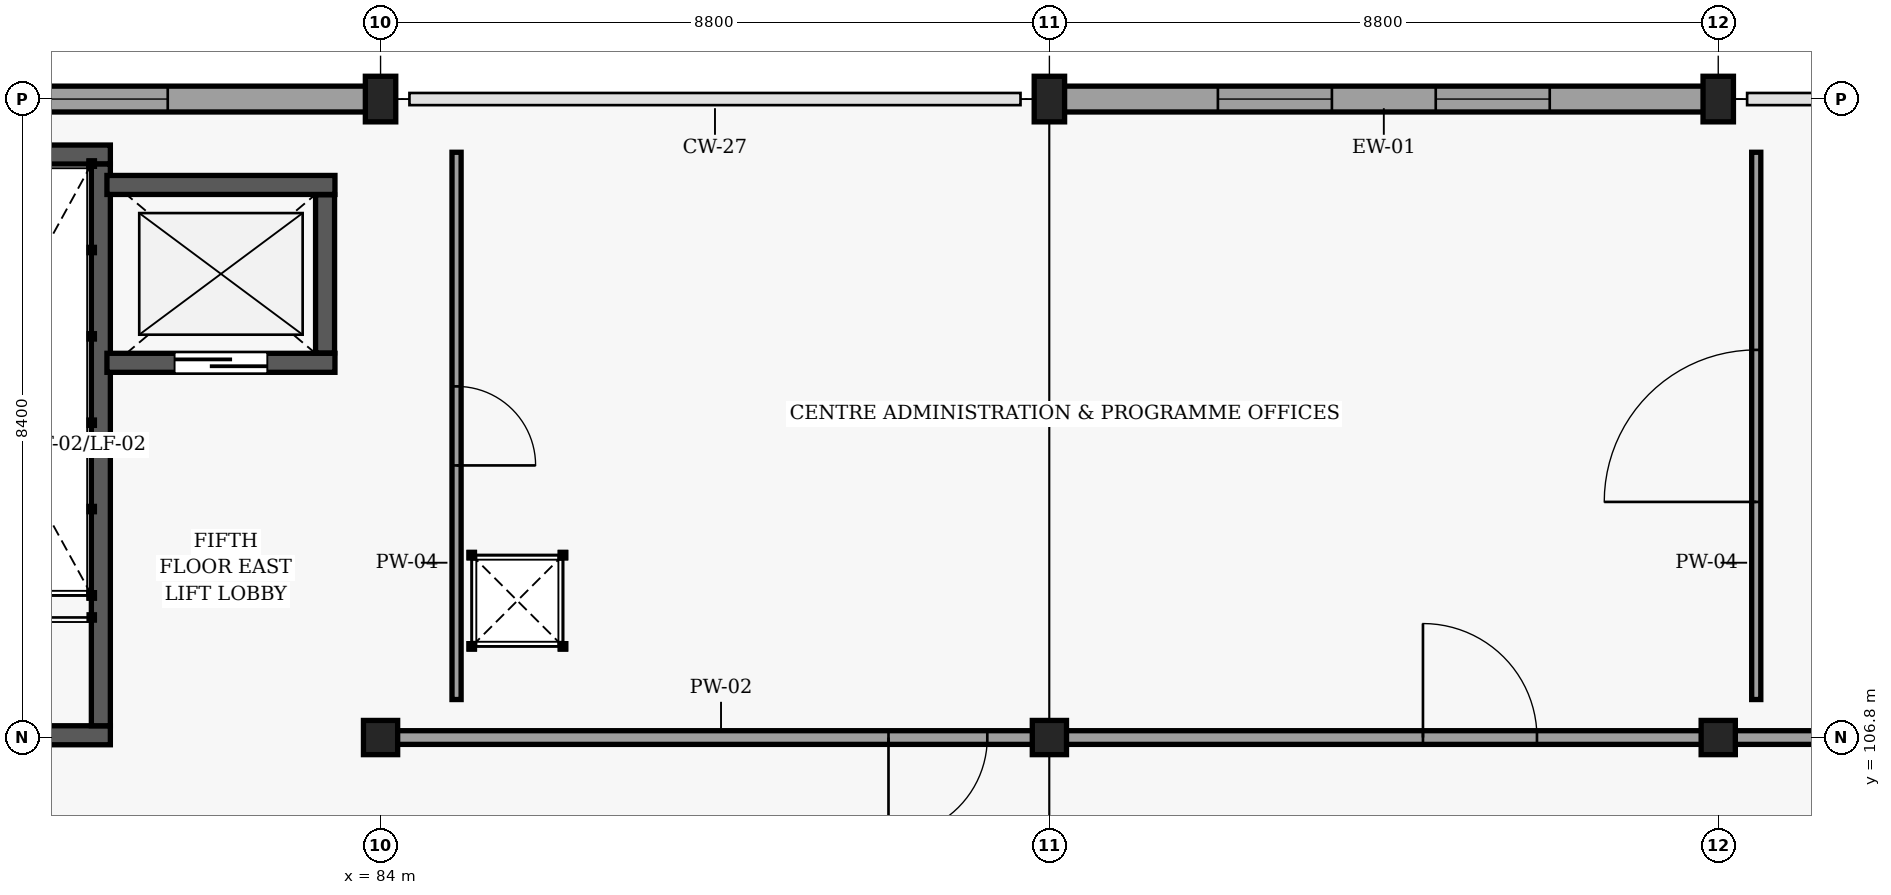
"""IFC4 building model, lengths in metres.
Left out: names, types, materials, properties, quantities, classifications, styles, units other than length and angle.
Written with IfcOpenShell. Run it as: python <this file> out.ifc"""

import sys

from ifc_helpers import new_model, si_unit, direction, frame, frame_2d, origin, origin_2d, place, context, subcontext, project, spatial, rectangle, extrude, element, fill, save


model = new_model("IFC4")
c1 = context("Model", 3, precision=1e-05, world=origin(), true_north=direction((0.0, 1.0)))
c2 = subcontext(c1, "Body", "Model", "MODEL_VIEW")
j1 = project(units=[si_unit("LENGTHUNIT", "METRE"), si_unit("PLANEANGLEUNIT", "RADIAN")], contexts=[c1])
p1 = place(None, origin())
s1 = spatial("IfcSite", under=j1, at=p1, CompositionType="ELEMENT")
p2 = place(p1, origin())
s2 = spatial("IfcBuilding", under=s1, at=p2, CompositionType="ELEMENT")
p3 = place(p2, frame((0.0, 0.0, 20.1)))
s3 = spatial("IfcBuildingStorey", under=s2, at=p3, CompositionType="ELEMENT", Elevation=20.1)
p4 = place(p3, frame((84.0, 106.8, 0.0), z_axis=(0.0, 0.0, 1.0), x_axis=(1.0, 0.0, 0.0)))
e1 = element("IfcColumn", 1, at=p4, inside=s3, PredefinedType="COLUMN", context=c2, shape_type="SweptSolid", body=[
    extrude(rectangle(XDim=0.45, YDim=0.45, at=origin_2d()), origin(), (0.0, 0.0, 1.0), 4.2),
])
p5 = place(p3, frame((84.0, 115.2, 0.0), z_axis=(0.0, 0.0, 1.0), x_axis=(1.0, 0.0, 0.0)))
e2 = element("IfcColumn", 2, at=p5, inside=s3, PredefinedType="COLUMN", context=c2, shape_type="SweptSolid", body=[
    extrude(rectangle(XDim=0.4, YDim=0.6, at=origin_2d()), origin(), (0.0, 0.0, 1.0), 4.2),
])
p6 = place(p3, frame((92.8, 106.8, 0.0), z_axis=(0.0, 0.0, 1.0), x_axis=(1.0, 0.0, 0.0)))
e3 = element("IfcColumn", 3, at=p6, inside=s3, PredefinedType="COLUMN", context=c2, shape_type="SweptSolid", body=[
    extrude(rectangle(XDim=0.45, YDim=0.45, at=origin_2d()), origin(), (0.0, 0.0, 1.0), 4.2),
])
p7 = place(p3, frame((92.8, 115.2, 0.0), z_axis=(0.0, 0.0, 1.0), x_axis=(1.0, 0.0, 0.0)))
e4 = element("IfcColumn", 4, at=p7, inside=s3, PredefinedType="COLUMN", context=c2, shape_type="SweptSolid", body=[
    extrude(rectangle(XDim=0.4, YDim=0.6, at=origin_2d()), origin(), (0.0, 0.0, 1.0), 4.2),
])
p8 = place(p3, frame((101.6, 106.8, 0.0), z_axis=(0.0, 0.0, 1.0), x_axis=(1.0, 0.0, 0.0)))
e5 = element("IfcColumn", 5, at=p8, inside=s3, PredefinedType="COLUMN", context=c2, shape_type="SweptSolid", body=[
    extrude(rectangle(XDim=0.45, YDim=0.45, at=origin_2d()), origin(), (0.0, 0.0, 1.0), 4.2),
])
p9 = place(p3, frame((101.6, 115.2, 0.0), z_axis=(0.0, 0.0, 1.0), x_axis=(1.0, 0.0, 0.0)))
e6 = element("IfcColumn", 6, at=p9, inside=s3, PredefinedType="COLUMN", context=c2, shape_type="SweptSolid", body=[
    extrude(rectangle(XDim=0.4, YDim=0.6, at=origin_2d()), origin(), (0.0, 0.0, 1.0), 4.2),
])
p10 = place(p3, frame((75.3, 115.2, 0.0), z_axis=(0.0, 0.0, 1.0), x_axis=(1.0, 0.0, 0.0)))
e7 = element("IfcWall", 7, at=p10, inside=s3, PredefinedType="SOLIDWALL", context=c2, shape_type="SweptSolid", body=[
    extrude(rectangle(XDim=8.6, YDim=0.34, at=frame_2d((4.3, 0.0))), origin(), (0.0, 0.0, 1.0), 3.568),
])
p11 = place(p10, frame((2.7, 0.0, 0.95)))
e8 = element("IfcOpeningElement", 8, at=p11, cuts=e7, PredefinedType="OPENING", context=c2, shape_type="SweptSolid", body=[
    extrude(rectangle(XDim=3.2, YDim=2.1, at=frame_2d((1.6, 1.05))), frame((0.0, 0.18, 0.0), z_axis=(0.0, -1.0, 0.0), x_axis=(1.0, 0.0, 0.0)), (0.0, 0.0, 1.0), 0.36),
])
p12 = place(p3, frame((92.9, 115.2, 0.0), z_axis=(0.0, 0.0, 1.0), x_axis=(1.0, 0.0, 0.0)))
e9 = element("IfcWall", 9, at=p12, inside=s3, PredefinedType="SOLIDWALL", context=c2, shape_type="SweptSolid", body=[
    extrude(rectangle(XDim=8.6, YDim=0.34, at=frame_2d((4.3, 0.0))), origin(), (0.0, 0.0, 1.0), 3.568),
])
p13 = place(p12, frame((2.117, 0.0, 0.948)))
e10 = element("IfcOpeningElement", 10, at=p13, cuts=e9, PredefinedType="OPENING", context=c2, shape_type="SweptSolid", body=[
    extrude(rectangle(XDim=1.5, YDim=2.4, at=frame_2d((0.75, 1.2))), frame((0.0, 0.18, 0.0), z_axis=(0.0, -1.0, 0.0), x_axis=(1.0, 0.0, 0.0)), (0.0, 0.0, 1.0), 0.36),
])
p14 = place(p12, frame((4.983, 0.0, 0.948)))
e11 = element("IfcOpeningElement", 11, at=p14, cuts=e9, PredefinedType="OPENING", context=c2, shape_type="SweptSolid", body=[
    extrude(rectangle(XDim=1.5, YDim=2.4, at=frame_2d((0.75, 1.2))), frame((0.0, 0.18, 0.0), z_axis=(0.0, -1.0, 0.0), x_axis=(1.0, 0.0, 0.0)), (0.0, 0.0, 1.0), 0.36),
])
p15 = place(p3, frame((80.445, 106.83, 0.0), z_axis=(0.0, 0.0, 1.0), x_axis=(-1.0, 0.0, 0.0)))
e12 = element("IfcWall", 12, at=p15, inside=s3, PredefinedType="SHEAR", context=c2, shape_type="SweptSolid", body=[
    extrude(rectangle(XDim=3.61, YDim=0.25, at=frame_2d((1.805, 0.0))), origin(), (0.0, 0.0, 1.0), 4.0),
])
p16 = place(p15, frame((1.235, 0.0, 0.0)))
e13 = element("IfcOpeningElement", 13, at=p16, cuts=e12, PredefinedType="OPENING", context=c2, shape_type="SweptSolid", body=[
    extrude(rectangle(XDim=1.14, YDim=2.15, at=frame_2d((0.57, 1.075))), frame((0.0, 0.135, 0.0), z_axis=(0.0, -1.0, 0.0), x_axis=(1.0, 0.0, 0.0)), (0.0, 0.0, 1.0), 0.27),
])
p17 = place(p3, frame((76.835, 114.47, 0.0), z_axis=(0.0, 0.0, 1.0), x_axis=(1.0, 0.0, 0.0)))
e14 = element("IfcWall", 14, at=p17, inside=s3, PredefinedType="SHEAR", context=c2, shape_type="SweptSolid", body=[
    extrude(rectangle(XDim=3.61, YDim=0.25, at=frame_2d((1.805, 0.0))), origin(), (0.0, 0.0, 1.0), 4.0),
])
p18 = place(p3, frame((80.32, 114.345, 0.0), z_axis=(0.0, 0.0, 1.0), x_axis=(0.0, -1.0, 0.0)))
e15 = element("IfcWall", 15, at=p18, inside=s3, PredefinedType="SHEAR", context=c2, shape_type="SweptSolid", body=[
    extrude(rectangle(XDim=7.39, YDim=0.25, at=frame_2d((3.695, 0.0))), origin(), (0.0, 0.0, 1.0), 4.0),
])
p19 = place(p3, frame((80.4, 111.73, 0.0), z_axis=(0.0, 0.0, 1.0), x_axis=(1.0, 0.0, 0.0)))
e16 = element("IfcWall", 16, at=p19, inside=s3, PredefinedType="SHEAR", context=c2, shape_type="SweptSolid", body=[
    extrude(rectangle(XDim=3.0, YDim=0.25, at=frame_2d((1.5, 0.0))), origin(), (0.0, 0.0, 1.0), 4.0),
])
p20 = place(p19, frame((0.89, 0.0, 0.0)))
e17 = element("IfcOpeningElement", 17, at=p20, cuts=e16, PredefinedType="OPENING", context=c2, shape_type="SweptSolid", body=[
    extrude(rectangle(XDim=1.22, YDim=2.18, at=frame_2d((0.61, 1.09))), frame((0.0, 0.135, 0.0), z_axis=(0.0, -1.0, 0.0), x_axis=(1.0, 0.0, 0.0)), (0.0, 0.0, 1.0), 0.27),
])
p21 = place(p3, frame((83.4, 114.07, 0.0), z_axis=(0.0, 0.0, 1.0), x_axis=(-1.0, 0.0, 0.0)))
e18 = element("IfcWall", 18, at=p21, inside=s3, PredefinedType="SHEAR", context=c2, shape_type="SweptSolid", body=[
    extrude(rectangle(XDim=3.0, YDim=0.25, at=frame_2d((1.5, 0.0))), origin(), (0.0, 0.0, 1.0), 4.0),
])
p22 = place(p3, frame((83.27, 111.86, 0.0), z_axis=(0.0, 0.0, 1.0), x_axis=(0.0, 1.0, 0.0)))
e19 = element("IfcWall", 19, at=p22, inside=s3, PredefinedType="SHEAR", context=c2, shape_type="SweptSolid", body=[
    extrude(rectangle(XDim=2.08, YDim=0.25, at=frame_2d((1.04, 0.0))), origin(), (0.0, 0.0, 1.0), 4.0),
])
p23 = place(p3, frame((84.2, 106.8, 0.0), z_axis=(0.0, 0.0, 1.0), x_axis=(1.0, 0.0, 0.0)))
e20 = element("IfcWall", 20, at=p23, inside=s3, PredefinedType="PARTITIONING", context=c2, shape_type="SweptSolid", body=[
    extrude(rectangle(XDim=28.53, YDim=0.18, at=frame_2d((14.265, 0.0))), origin(), (0.0, 0.0, 1.0), 3.568),
])
p24 = place(p23, frame((6.483, 0.0, 0.0)))
e21 = element("IfcOpeningElement", 21, at=p24, cuts=e20, PredefinedType="OPENING", context=c2, shape_type="SweptSolid", body=[
    extrude(rectangle(XDim=1.3, YDim=2.2, at=frame_2d((0.65, 1.1))), frame((0.0, 0.1, 0.0), z_axis=(0.0, -1.0, 0.0), x_axis=(1.0, 0.0, 0.0)), (0.0, 0.0, 1.0), 0.2),
])
p25 = place(p23, frame((13.515, 0.0, 0.0)))
e22 = element("IfcOpeningElement", 22, at=p25, cuts=e20, PredefinedType="OPENING", context=c2, shape_type="SweptSolid", body=[
    extrude(rectangle(XDim=1.5, YDim=2.25, at=frame_2d((0.75, 1.125))), frame((0.0, 0.1, 0.0), z_axis=(0.0, -1.0, 0.0), x_axis=(1.0, 0.0, 0.0)), (0.0, 0.0, 1.0), 0.2),
])
p26 = place(p23, frame((20.777, 0.0, 0.0)))
e23 = element("IfcOpeningElement", 23, at=p26, cuts=e20, PredefinedType="OPENING", context=c2, shape_type="SweptSolid", body=[
    extrude(rectangle(XDim=1.24, YDim=2.2, at=frame_2d((0.62, 1.1))), frame((0.0, 0.1, 0.0), z_axis=(0.0, -1.0, 0.0), x_axis=(1.0, 0.0, 0.0)), (0.0, 0.0, 1.0), 0.2),
])
p27 = place(p3, frame((85.0, 107.3, 0.0), z_axis=(0.0, 0.0, 1.0), x_axis=(0.0, 1.0, 0.0)))
e24 = element("IfcWall", 24, at=p27, inside=s3, PredefinedType="PARTITIONING", context=c2, shape_type="SweptSolid", body=[
    extrude(rectangle(XDim=7.2, YDim=0.12, at=frame_2d((3.6, 0.0))), origin(), (0.0, 0.0, 1.0), 3.985),
])
p28 = place(p27, frame((3.08, 0.0, 0.0)))
e25 = element("IfcOpeningElement", 25, at=p28, cuts=e24, PredefinedType="OPENING", context=c2, shape_type="SweptSolid", body=[
    extrude(rectangle(XDim=1.04, YDim=2.08, at=frame_2d((0.52, 1.04))), frame((0.0, 0.07, 0.0), z_axis=(0.0, -1.0, 0.0), x_axis=(1.0, 0.0, 0.0)), (0.0, 0.0, 1.0), 0.14),
])
p29 = place(p3, frame((102.1, 107.3, 0.0), z_axis=(0.0, 0.0, 1.0), x_axis=(0.0, 1.0, 0.0)))
e26 = element("IfcWall", 26, at=p29, inside=s3, PredefinedType="PARTITIONING", context=c2, shape_type="SweptSolid", body=[
    extrude(rectangle(XDim=7.2, YDim=0.12, at=frame_2d((3.6, 0.0))), origin(), (0.0, 0.0, 1.0), 3.985),
])
p30 = place(p29, frame((2.6, 0.0, 0.0)))
e27 = element("IfcOpeningElement", 27, at=p30, cuts=e26, PredefinedType="OPENING", context=c2, shape_type="SweptSolid", body=[
    extrude(rectangle(XDim=2.0, YDim=2.3, at=frame_2d((1.0, 1.15))), frame((0.0, 0.07, 0.0), z_axis=(0.0, -1.0, 0.0), x_axis=(1.0, 0.0, 0.0)), (0.0, 0.0, 1.0), 0.14),
])
p31 = place(p11, origin())
e28 = element("IfcWindow", 28, at=p31, inside=s3, PartitioningType="SINGLE_PANEL", PredefinedType="WINDOW", context=c2, shape_type="SweptSolid", body=[
    extrude(rectangle(XDim=3.2, YDim=2.1, at=frame_2d((1.6, 1.05))), frame((0.0, 0.03, 0.0), z_axis=(0.0, -1.0, 0.0), x_axis=(1.0, 0.0, 0.0)), (0.0, 0.0, 1.0), 0.06),
])
fill(e8, e28)
p32 = place(p13, origin())
e29 = element("IfcWindow", 29, at=p32, inside=s3, PartitioningType="SINGLE_PANEL", PredefinedType="WINDOW", context=c2, shape_type="SweptSolid", body=[
    extrude(rectangle(XDim=1.5, YDim=2.4, at=frame_2d((0.75, 1.2))), frame((0.0, 0.03, 0.0), z_axis=(0.0, -1.0, 0.0), x_axis=(1.0, 0.0, 0.0)), (0.0, 0.0, 1.0), 0.06),
])
fill(e10, e29)
p33 = place(p14, origin())
e30 = element("IfcWindow", 30, at=p33, inside=s3, PartitioningType="SINGLE_PANEL", PredefinedType="WINDOW", context=c2, shape_type="SweptSolid", body=[
    extrude(rectangle(XDim=1.5, YDim=2.4, at=frame_2d((0.75, 1.2))), frame((0.0, 0.03, 0.0), z_axis=(0.0, -1.0, 0.0), x_axis=(1.0, 0.0, 0.0)), (0.0, 0.0, 1.0), 0.06),
])
fill(e11, e30)
p34 = place(p20, origin())
e31 = element("IfcDoor", 31, at=p34, inside=s3, OperationType="SLIDING_TO_RIGHT", PredefinedType="DOOR", context=c2, shape_type="SweptSolid", body=[
    extrude(rectangle(XDim=1.22, YDim=2.18, at=frame_2d((0.61, 1.09))), frame((0.0, 0.025, 0.0), z_axis=(0.0, -1.0, 0.0), x_axis=(1.0, 0.0, 0.0)), (0.0, 0.0, 1.0), 0.05),
])
fill(e17, e31)
p35 = place(p24, origin())
e32 = element("IfcDoor", 32, at=p35, inside=s3, OperationType="SINGLE_SWING_RIGHT", PredefinedType="DOOR", context=c2, shape_type="SweptSolid", body=[
    extrude(rectangle(XDim=1.3, YDim=2.2, at=frame_2d((0.65, 1.1))), frame((0.0, 0.025, 0.0), z_axis=(0.0, -1.0, 0.0), x_axis=(1.0, 0.0, 0.0)), (0.0, 0.0, 1.0), 0.05),
])
fill(e21, e32)
p36 = place(p25, origin())
e33 = element("IfcDoor", 33, at=p36, inside=s3, OperationType="DOUBLE_DOOR_SINGLE_SWING", PredefinedType="DOOR", context=c2, shape_type="SweptSolid", body=[
    extrude(rectangle(XDim=1.5, YDim=2.25, at=frame_2d((0.75, 1.125))), frame((0.0, 0.025, 0.0), z_axis=(0.0, -1.0, 0.0), x_axis=(1.0, 0.0, 0.0)), (0.0, 0.0, 1.0), 0.05),
])
fill(e22, e33)
p37 = place(p28, origin())
e34 = element("IfcDoor", 34, at=p37, inside=s3, OperationType="SINGLE_SWING_RIGHT", PredefinedType="DOOR", context=c2, shape_type="SweptSolid", body=[
    extrude(rectangle(XDim=1.04, YDim=2.08, at=frame_2d((0.52, 1.04))), frame((0.0, 0.025, 0.0), z_axis=(0.0, -1.0, 0.0), x_axis=(1.0, 0.0, 0.0)), (0.0, 0.0, 1.0), 0.05),
])
fill(e25, e34)
p38 = place(p30, origin())
e35 = element("IfcDoor", 35, at=p38, inside=s3, OperationType="DOUBLE_DOOR_SINGLE_SWING", PredefinedType="DOOR", context=c2, shape_type="SweptSolid", body=[
    extrude(rectangle(XDim=2.0, YDim=2.3, at=frame_2d((1.0, 1.15))), frame((0.0, 0.025, 0.0), z_axis=(0.0, -1.0, 0.0), x_axis=(1.0, 0.0, 0.0)), (0.0, 0.0, 1.0), 0.05),
])
fill(e27, e35)
save(model, sys.argv[1])
